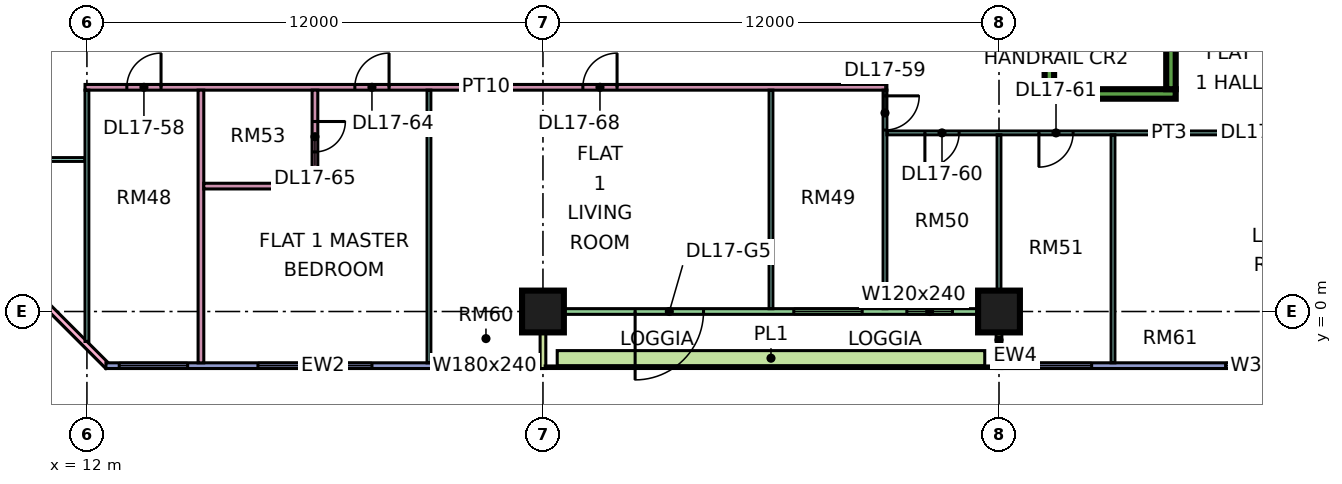
"""IFC4 building model, lengths in metres.
Left out: names, types, materials, properties, quantities, classifications, styles, units other than length and angle.
Written with IfcOpenShell. Run it as: python <this file> out.ifc"""

import sys

from ifc_helpers import new_model, si_unit, direction, frame, frame_2d, origin, origin_2d, place, context, subcontext, project, spatial, rectangle, extrude, element, fill, save


model = new_model("IFC4")
c1 = context("Model", 3, precision=1e-05, world=origin(), true_north=direction((0.0, 1.0)))
c2 = subcontext(c1, "Body", "Model", "MODEL_VIEW")
j1 = project(units=[si_unit("LENGTHUNIT", "METRE"), si_unit("PLANEANGLEUNIT", "RADIAN")], contexts=[c1])
p1 = place(None, origin())
s1 = spatial("IfcSite", under=j1, at=p1, CompositionType="ELEMENT")
p2 = place(p1, origin())
s2 = spatial("IfcBuilding", under=s1, at=p2, CompositionType="ELEMENT")
p3 = place(p2, frame((0.0, 0.0, 78.9)))
s3 = spatial("IfcBuildingStorey", under=s2, at=p3, CompositionType="ELEMENT", Elevation=78.9)
for number, where, z_axis, x_axis in (
    (1, (24.0, 0.0, 0.0), (0.0, 0.0, 1.0), (1.0, 0.0, 0.0)),
    (2, (36.0, 0.0, 0.0), (0.0, 0.0, 1.0), (1.0, 0.0, 0.0)),
):
    element("IfcColumn", number, at=place(p3, frame(where, z_axis=z_axis, x_axis=x_axis)), inside=s3, PredefinedType="COLUMN", context=c2, shape_type="SweptSolid", body=[
        extrude(rectangle(XDim=1.1, YDim=1.1, at=origin_2d()), origin(), (0.0, 0.0, 1.0), 3.75),
    ])
p4 = place(p3, frame((37.2, 5.725, 0.0), z_axis=(0.0, 0.0, 1.0), x_axis=(1.0, 0.0, 0.0)))
e3 = element("IfcWall", 3, at=p4, inside=s3, PredefinedType="SHEAR", context=c2, shape_type="SweptSolid", body=[
    extrude(rectangle(XDim=3.45, YDim=0.25, at=frame_2d((1.725, 0.0))), origin(), (0.0, 0.0, 1.0), 3.75),
])
for number, where, z_axis, x_axis in (
    (4, (37.325, 5.85, 0.0), (0.0, 0.0, 1.0), (0.0, 1.0, 0.0)),
    (5, (40.525, 5.85, 0.0), (0.0, 0.0, 1.0), (0.0, 1.0, 0.0)),
):
    element("IfcWall", number, at=place(p3, frame(where, z_axis=z_axis, x_axis=x_axis)), inside=s3, PredefinedType="SHEAR", context=c2, shape_type="SweptSolid", body=[
        extrude(rectangle(XDim=6.5, YDim=0.25, at=frame_2d((3.25, 0.0))), origin(), (0.0, 0.0, 1.0), 3.75),
    ])
p5 = place(p3, frame((-1.447, 12.553, 0.0), z_axis=(0.0, 0.0, 1.0), x_axis=(0.707106781187, -0.707106781187, 0.0)))
e6 = element("IfcWall", 6, at=p5, inside=s3, PredefinedType="SOLIDWALL", context=c2, shape_type="SweptSolid", body=[
    extrude(rectangle(XDim=19.799, YDim=0.15, at=frame_2d((9.899, 0.0))), origin(), (0.0, 0.0, 1.0), 3.35),
])
p6 = place(p5, frame((2.212, 0.0, 0.45)))
e7 = element("IfcOpeningElement", 7, at=p6, cuts=e6, PredefinedType="OPENING", context=c2, shape_type="SweptSolid", body=[
    extrude(rectangle(XDim=3.0, YDim=2.4, at=frame_2d((1.5, 1.2))), frame((0.0, 0.085, 0.0), z_axis=(0.0, -1.0, 0.0), x_axis=(1.0, 0.0, 0.0)), (0.0, 0.0, 1.0), 0.17),
])
p7 = place(p5, frame((10.216, 0.0, 0.45)))
e8 = element("IfcOpeningElement", 8, at=p7, cuts=e6, PredefinedType="OPENING", context=c2, shape_type="SweptSolid", body=[
    extrude(rectangle(XDim=3.0, YDim=2.4, at=frame_2d((1.5, 1.2))), frame((0.0, 0.085, 0.0), z_axis=(0.0, -1.0, 0.0), x_axis=(1.0, 0.0, 0.0)), (0.0, 0.0, 1.0), 0.17),
])
p8 = place(p3, frame((12.5, -1.425, 0.0), z_axis=(0.0, 0.0, 1.0), x_axis=(1.0, 0.0, 0.0)))
e9 = element("IfcWall", 9, at=p8, inside=s3, PredefinedType="SOLIDWALL", context=c2, shape_type="SweptSolid", body=[
    extrude(rectangle(XDim=11.425, YDim=0.15, at=frame_2d((5.712, 0.0))), origin(), (0.0, 0.0, 1.0), 3.35),
])
p9 = place(p8, frame((0.35, 0.0, 0.45)))
e10 = element("IfcOpeningElement", 10, at=p9, cuts=e9, PredefinedType="OPENING", context=c2, shape_type="SweptSolid", body=[
    extrude(rectangle(XDim=1.8, YDim=2.4, at=frame_2d((0.9, 1.2))), frame((0.0, 0.085, 0.0), z_axis=(0.0, -1.0, 0.0), x_axis=(1.0, 0.0, 0.0)), (0.0, 0.0, 1.0), 0.17),
])
p10 = place(p8, frame((4.0, 0.0, 0.45)))
e11 = element("IfcOpeningElement", 11, at=p10, cuts=e9, PredefinedType="OPENING", context=c2, shape_type="SweptSolid", body=[
    extrude(rectangle(XDim=3.0, YDim=2.4, at=frame_2d((1.5, 1.2))), frame((0.0, 0.085, 0.0), z_axis=(0.0, -1.0, 0.0), x_axis=(1.0, 0.0, 0.0)), (0.0, 0.0, 1.0), 0.17),
])
p11 = place(p8, frame((9.062, 0.0, 0.45)))
e12 = element("IfcOpeningElement", 12, at=p11, cuts=e9, PredefinedType="OPENING", context=c2, shape_type="SweptSolid", body=[
    extrude(rectangle(XDim=1.8, YDim=2.4, at=frame_2d((0.9, 1.2))), frame((0.0, 0.085, 0.0), z_axis=(0.0, -1.0, 0.0), x_axis=(1.0, 0.0, 0.0)), (0.0, 0.0, 1.0), 0.17),
])
p12 = place(p3, frame((24.075, 0.0, 0.0), z_axis=(0.0, 0.0, 1.0), x_axis=(1.0, 0.0, 0.0)))
e13 = element("IfcWall", 13, at=p12, inside=s3, PredefinedType="SOLIDWALL", context=c2, shape_type="SweptSolid", body=[
    extrude(rectangle(XDim=11.85, YDim=0.15, at=frame_2d((5.925, 0.0))), origin(), (0.0, 0.0, 1.0), 3.35),
])
p13 = place(p12, frame((2.35, 0.0, 0.0)))
e14 = element("IfcOpeningElement", 14, at=p13, cuts=e13, PredefinedType="OPENING", context=c2, shape_type="SweptSolid", body=[
    extrude(rectangle(XDim=1.8, YDim=2.4, at=frame_2d((0.9, 1.2))), frame((0.0, 0.085, 0.0), z_axis=(0.0, -1.0, 0.0), x_axis=(1.0, 0.0, 0.0)), (0.0, 0.0, 1.0), 0.17),
])
p14 = place(p12, frame((6.525, 0.0, 0.45)))
e15 = element("IfcOpeningElement", 15, at=p14, cuts=e13, PredefinedType="OPENING", context=c2, shape_type="SweptSolid", body=[
    extrude(rectangle(XDim=1.8, YDim=2.4, at=frame_2d((0.9, 1.2))), frame((0.0, 0.085, 0.0), z_axis=(0.0, -1.0, 0.0), x_axis=(1.0, 0.0, 0.0)), (0.0, 0.0, 1.0), 0.17),
])
p15 = place(p12, frame((9.5, 0.0, 0.45)))
e16 = element("IfcOpeningElement", 16, at=p15, cuts=e13, PredefinedType="OPENING", context=c2, shape_type="SweptSolid", body=[
    extrude(rectangle(XDim=1.2, YDim=2.4, at=frame_2d((0.6, 1.2))), frame((0.0, 0.085, 0.0), z_axis=(0.0, -1.0, 0.0), x_axis=(1.0, 0.0, 0.0)), (0.0, 0.0, 1.0), 0.17),
])
for number, where, z_axis, x_axis in (
    (17, (24.0, -1.5, 0.0), (0.0, 0.0, 1.0), (0.0, 1.0, 0.0)),
    (18, (36.0, -1.5, 0.0), (0.0, 0.0, 1.0), (0.0, 1.0, 0.0)),
):
    element("IfcWall", number, at=place(p3, frame(where, z_axis=z_axis, x_axis=x_axis)), inside=s3, PredefinedType="SOLIDWALL", context=c2, shape_type="SweptSolid", body=[
        extrude(rectangle(XDim=1.5, YDim=0.15, at=frame_2d((0.75, 0.0))), origin(), (0.0, 0.0, 1.0), 3.35),
    ])
p16 = place(p3, frame((36.075, -1.425, 0.0), z_axis=(0.0, 0.0, 1.0), x_axis=(1.0, 0.0, 0.0)))
e19 = element("IfcWall", 19, at=p16, inside=s3, PredefinedType="SOLIDWALL", context=c2, shape_type="SweptSolid", body=[
    extrude(rectangle(XDim=11.85, YDim=0.15, at=frame_2d((5.925, 0.0))), origin(), (0.0, 0.0, 1.0), 3.35),
])
p17 = place(p16, frame((0.562, 0.0, 0.45)))
e20 = element("IfcOpeningElement", 20, at=p17, cuts=e19, PredefinedType="OPENING", context=c2, shape_type="SweptSolid", body=[
    extrude(rectangle(XDim=1.8, YDim=2.4, at=frame_2d((0.9, 1.2))), frame((0.0, 0.085, 0.0), z_axis=(0.0, -1.0, 0.0), x_axis=(1.0, 0.0, 0.0)), (0.0, 0.0, 1.0), 0.17),
])
p18 = place(p16, frame((5.887, 0.0, 0.45)))
e21 = element("IfcOpeningElement", 21, at=p18, cuts=e19, PredefinedType="OPENING", context=c2, shape_type="SweptSolid", body=[
    extrude(rectangle(XDim=3.0, YDim=2.4, at=frame_2d((1.5, 1.2))), frame((0.0, 0.085, 0.0), z_axis=(0.0, -1.0, 0.0), x_axis=(1.0, 0.0, 0.0)), (0.0, 0.0, 1.0), 0.17),
])
p19 = place(p3, frame((24.375, -1.229, 0.0), z_axis=(0.0, 0.0, 1.0), x_axis=(1.0, 0.0, 0.0)))
e22 = element("IfcWall", 22, at=p19, inside=s3, PredefinedType="SOLIDWALL", context=c2, shape_type="SweptSolid", body=[
    extrude(rectangle(XDim=11.25, YDim=0.4, at=frame_2d((5.625, 0.0))), origin(), (0.0, 0.0, 1.0), 0.7),
])
p20 = place(p3, frame((9.05, 4.0, 0.0), z_axis=(0.0, 0.0, 1.0), x_axis=(1.0, 0.0, 0.0)))
e23 = element("IfcWall", 23, at=p20, inside=s3, PredefinedType="PARTITIONING", context=c2, shape_type="SweptSolid", body=[
    extrude(rectangle(XDim=2.9, YDim=0.1, at=frame_2d((1.45, 0.0))), origin(), (0.0, 0.0, 1.0), 3.35),
])
p21 = place(p3, frame((11.95, 5.9, 0.0), z_axis=(0.0, 0.0, 1.0), x_axis=(1.0, 0.0, 0.0)))
e24 = element("IfcWall", 24, at=p21, inside=s3, PredefinedType="PARTITIONING", context=c2, shape_type="SweptSolid", body=[
    extrude(rectangle(XDim=21.1, YDim=0.15, at=frame_2d((10.55, 0.0))), origin(), (0.0, 0.0, 1.0), 3.35),
])
p22 = place(p21, frame((1.1, 0.0, 0.0)))
e25 = element("IfcOpeningElement", 25, at=p22, cuts=e24, PredefinedType="OPENING", context=c2, shape_type="SweptSolid", body=[
    extrude(rectangle(XDim=0.9, YDim=2.1, at=frame_2d((0.45, 1.05))), frame((0.0, 0.085, 0.0), z_axis=(0.0, -1.0, 0.0), x_axis=(1.0, 0.0, 0.0)), (0.0, 0.0, 1.0), 0.17),
])
p23 = place(p21, frame((7.1, 0.0, 0.0)))
e26 = element("IfcOpeningElement", 26, at=p23, cuts=e24, PredefinedType="OPENING", context=c2, shape_type="SweptSolid", body=[
    extrude(rectangle(XDim=0.9, YDim=2.1, at=frame_2d((0.45, 1.05))), frame((0.0, 0.085, 0.0), z_axis=(0.0, -1.0, 0.0), x_axis=(1.0, 0.0, 0.0)), (0.0, 0.0, 1.0), 0.17),
])
p24 = place(p21, frame((13.1, 0.0, 0.0)))
e27 = element("IfcOpeningElement", 27, at=p24, cuts=e24, PredefinedType="OPENING", context=c2, shape_type="SweptSolid", body=[
    extrude(rectangle(XDim=0.9, YDim=2.1, at=frame_2d((0.45, 1.05))), frame((0.0, 0.085, 0.0), z_axis=(0.0, -1.0, 0.0), x_axis=(1.0, 0.0, 0.0)), (0.0, 0.0, 1.0), 0.17),
])
p25 = place(p3, frame((12.0, -0.788, 0.0), z_axis=(0.0, 0.0, 1.0), x_axis=(0.0, 1.0, 0.0)))
e28 = element("IfcWall", 28, at=p25, inside=s3, PredefinedType="PARTITIONING", context=c2, shape_type="SweptSolid", body=[
    extrude(rectangle(XDim=6.613, YDim=0.1, at=frame_2d((3.306, 0.0))), origin(), (0.0, 0.0, 1.0), 3.35),
])
p26 = place(p3, frame((15.0, -1.351, 0.0), z_axis=(0.0, 0.0, 1.0), x_axis=(0.0, 1.0, 0.0)))
e29 = element("IfcWall", 29, at=p26, inside=s3, PredefinedType="PARTITIONING", context=c2, shape_type="SweptSolid", body=[
    extrude(rectangle(XDim=7.176, YDim=0.15, at=frame_2d((3.588, 0.0))), origin(), (0.0, 0.0, 1.0), 3.35),
])
p27 = place(p3, frame((15.075, 3.3, 0.0), z_axis=(0.0, 0.0, 1.0), x_axis=(1.0, 0.0, 0.0)))
e30 = element("IfcWall", 30, at=p27, inside=s3, PredefinedType="PARTITIONING", context=c2, shape_type="SweptSolid", body=[
    extrude(rectangle(XDim=3.0, YDim=0.15, at=frame_2d((1.5, 0.0))), origin(), (0.0, 0.0, 1.0), 3.35),
])
p28 = place(p3, frame((18.0, 3.375, 0.0), z_axis=(0.0, 0.0, 1.0), x_axis=(0.0, 1.0, 0.0)))
e31 = element("IfcWall", 31, at=p28, inside=s3, PredefinedType="PARTITIONING", context=c2, shape_type="SweptSolid", body=[
    extrude(rectangle(XDim=2.45, YDim=0.15, at=frame_2d((1.225, 0.0))), origin(), (0.0, 0.0, 1.0), 3.35),
])
p29 = place(p28, frame((0.825, 0.0, 0.0)))
e32 = element("IfcOpeningElement", 32, at=p29, cuts=e31, PredefinedType="OPENING", context=c2, shape_type="SweptSolid", body=[
    extrude(rectangle(XDim=0.8, YDim=2.1, at=frame_2d((0.4, 1.05))), frame((0.0, 0.085, 0.0), z_axis=(0.0, -1.0, 0.0), x_axis=(1.0, 0.0, 0.0)), (0.0, 0.0, 1.0), 0.17),
])
p30 = place(p3, frame((21.0, -1.35, 0.0), z_axis=(0.0, 0.0, 1.0), x_axis=(0.0, 1.0, 0.0)))
e33 = element("IfcWall", 33, at=p30, inside=s3, PredefinedType="PARTITIONING", context=c2, shape_type="SweptSolid", body=[
    extrude(rectangle(XDim=7.175, YDim=0.1, at=frame_2d((3.587, 0.0))), origin(), (0.0, 0.0, 1.0), 3.35),
])
p31 = place(p3, frame((30.0, 0.074, 0.0), z_axis=(0.0, 0.0, 1.0), x_axis=(0.0, 1.0, 0.0)))
e34 = element("IfcWall", 34, at=p31, inside=s3, PredefinedType="PARTITIONING", context=c2, shape_type="SweptSolid", body=[
    extrude(rectangle(XDim=5.751, YDim=0.1, at=frame_2d((2.875, 0.0))), origin(), (0.0, 0.0, 1.0), 3.35),
])
p32 = place(p3, frame((33.0, 0.074, 0.0), z_axis=(0.0, 0.0, 1.0), x_axis=(0.0, 1.0, 0.0)))
e35 = element("IfcWall", 35, at=p32, inside=s3, PredefinedType="PARTITIONING", context=c2, shape_type="SweptSolid", body=[
    extrude(rectangle(XDim=5.751, YDim=0.1, at=frame_2d((2.875, 0.0))), origin(), (0.0, 0.0, 1.0), 3.35),
])
p33 = place(p32, frame((4.701, 0.0, 0.0)))
e36 = element("IfcOpeningElement", 36, at=p33, cuts=e35, PredefinedType="OPENING", context=c2, shape_type="SweptSolid", body=[
    extrude(rectangle(XDim=0.9, YDim=2.1, at=frame_2d((0.45, 1.05))), frame((0.0, 0.06, 0.0), z_axis=(0.0, -1.0, 0.0), x_axis=(1.0, 0.0, 0.0)), (0.0, 0.0, 1.0), 0.12),
])
p34 = place(p3, frame((33.05, 4.7, 0.0), z_axis=(0.0, 0.0, 1.0), x_axis=(1.0, 0.0, 0.0)))
e37 = element("IfcWall", 37, at=p34, inside=s3, PredefinedType="PARTITIONING", context=c2, shape_type="SweptSolid", body=[
    extrude(rectangle(XDim=14.85, YDim=0.1, at=frame_2d((7.425, 0.0))), origin(), (0.0, 0.0, 1.0), 3.35),
])
p35 = place(p34, frame((1.0, 0.0, 0.0)))
e38 = element("IfcOpeningElement", 38, at=p35, cuts=e37, PredefinedType="OPENING", context=c2, shape_type="SweptSolid", body=[
    extrude(rectangle(XDim=0.9, YDim=2.1, at=frame_2d((0.45, 1.05))), frame((0.0, 0.06, 0.0), z_axis=(0.0, -1.0, 0.0), x_axis=(1.0, 0.0, 0.0)), (0.0, 0.0, 1.0), 0.12),
])
p36 = place(p34, frame((4.0, 0.0, 0.0)))
e39 = element("IfcOpeningElement", 39, at=p36, cuts=e37, PredefinedType="OPENING", context=c2, shape_type="SweptSolid", body=[
    extrude(rectangle(XDim=0.9, YDim=2.1, at=frame_2d((0.45, 1.05))), frame((0.0, 0.06, 0.0), z_axis=(0.0, -1.0, 0.0), x_axis=(1.0, 0.0, 0.0)), (0.0, 0.0, 1.0), 0.12),
])
p37 = place(p34, frame((10.0, 0.0, 0.0)))
e40 = element("IfcOpeningElement", 40, at=p37, cuts=e37, PredefinedType="OPENING", context=c2, shape_type="SweptSolid", body=[
    extrude(rectangle(XDim=0.9, YDim=2.1, at=frame_2d((0.45, 1.05))), frame((0.0, 0.06, 0.0), z_axis=(0.0, -1.0, 0.0), x_axis=(1.0, 0.0, 0.0)), (0.0, 0.0, 1.0), 0.12),
])
p38 = place(p3, frame((36.0, 0.0, 0.0), z_axis=(0.0, 0.0, 1.0), x_axis=(0.0, 1.0, 0.0)))
e41 = element("IfcWall", 41, at=p38, inside=s3, PredefinedType="PARTITIONING", context=c2, shape_type="SweptSolid", body=[
    extrude(rectangle(XDim=4.65, YDim=0.1, at=frame_2d((2.325, 0.0))), origin(), (0.0, 0.0, 1.0), 3.35),
])
p39 = place(p3, frame((39.0, -1.35, 0.0), z_axis=(0.0, 0.0, 1.0), x_axis=(0.0, 1.0, 0.0)))
e42 = element("IfcWall", 42, at=p39, inside=s3, PredefinedType="PARTITIONING", context=c2, shape_type="SweptSolid", body=[
    extrude(rectangle(XDim=6.0, YDim=0.1, at=frame_2d((3.0, 0.0))), origin(), (0.0, 0.0, 1.0), 3.35),
])
p40 = place(p9, origin())
e43 = element("IfcWindow", 43, at=p40, inside=s3, PartitioningType="SINGLE_PANEL", PredefinedType="WINDOW", context=c2, shape_type="SweptSolid", body=[
    extrude(rectangle(XDim=1.8, YDim=2.4, at=frame_2d((0.9, 1.2))), frame((0.0, 0.03, 0.0), z_axis=(0.0, -1.0, 0.0), x_axis=(1.0, 0.0, 0.0)), (0.0, 0.0, 1.0), 0.06),
])
fill(e10, e43)
p41 = place(p10, origin())
e44 = element("IfcWindow", 44, at=p41, inside=s3, PartitioningType="SINGLE_PANEL", PredefinedType="WINDOW", context=c2, shape_type="SweptSolid", body=[
    extrude(rectangle(XDim=3.0, YDim=2.4, at=frame_2d((1.5, 1.2))), frame((0.0, 0.03, 0.0), z_axis=(0.0, -1.0, 0.0), x_axis=(1.0, 0.0, 0.0)), (0.0, 0.0, 1.0), 0.06),
])
fill(e11, e44)
p42 = place(p11, origin())
e45 = element("IfcWindow", 45, at=p42, inside=s3, PartitioningType="SINGLE_PANEL", PredefinedType="WINDOW", context=c2, shape_type="SweptSolid", body=[
    extrude(rectangle(XDim=1.8, YDim=2.4, at=frame_2d((0.9, 1.2))), frame((0.0, 0.03, 0.0), z_axis=(0.0, -1.0, 0.0), x_axis=(1.0, 0.0, 0.0)), (0.0, 0.0, 1.0), 0.06),
])
fill(e12, e45)
p43 = place(p13, frame((1.8, 0.0, 0.0), z_axis=(0.0, 0.0, 1.0), x_axis=(-1.0, 0.0, 0.0)))
e46 = element("IfcDoor", 46, at=p43, inside=s3, OperationType="DOUBLE_DOOR_SINGLE_SWING", PredefinedType="DOOR", context=c2, shape_type="SweptSolid", body=[
    extrude(rectangle(XDim=1.8, YDim=2.4, at=frame_2d((0.9, 1.2))), frame((0.0, 0.025, 0.0), z_axis=(0.0, -1.0, 0.0), x_axis=(1.0, 0.0, 0.0)), (0.0, 0.0, 1.0), 0.05),
])
fill(e14, e46)
p44 = place(p14, origin())
e47 = element("IfcWindow", 47, at=p44, inside=s3, PartitioningType="SINGLE_PANEL", PredefinedType="WINDOW", context=c2, shape_type="SweptSolid", body=[
    extrude(rectangle(XDim=1.8, YDim=2.4, at=frame_2d((0.9, 1.2))), frame((0.0, 0.03, 0.0), z_axis=(0.0, -1.0, 0.0), x_axis=(1.0, 0.0, 0.0)), (0.0, 0.0, 1.0), 0.06),
])
fill(e15, e47)
p45 = place(p15, origin())
e48 = element("IfcWindow", 48, at=p45, inside=s3, PartitioningType="SINGLE_PANEL", PredefinedType="WINDOW", context=c2, shape_type="SweptSolid", body=[
    extrude(rectangle(XDim=1.2, YDim=2.4, at=frame_2d((0.6, 1.2))), frame((0.0, 0.03, 0.0), z_axis=(0.0, -1.0, 0.0), x_axis=(1.0, 0.0, 0.0)), (0.0, 0.0, 1.0), 0.06),
])
fill(e16, e48)
p46 = place(p17, origin())
e49 = element("IfcWindow", 49, at=p46, inside=s3, PartitioningType="SINGLE_PANEL", PredefinedType="WINDOW", context=c2, shape_type="SweptSolid", body=[
    extrude(rectangle(XDim=1.8, YDim=2.4, at=frame_2d((0.9, 1.2))), frame((0.0, 0.03, 0.0), z_axis=(0.0, -1.0, 0.0), x_axis=(1.0, 0.0, 0.0)), (0.0, 0.0, 1.0), 0.06),
])
fill(e20, e49)
p47 = place(p18, origin())
e50 = element("IfcWindow", 50, at=p47, inside=s3, PartitioningType="SINGLE_PANEL", PredefinedType="WINDOW", context=c2, shape_type="SweptSolid", body=[
    extrude(rectangle(XDim=3.0, YDim=2.4, at=frame_2d((1.5, 1.2))), frame((0.0, 0.03, 0.0), z_axis=(0.0, -1.0, 0.0), x_axis=(1.0, 0.0, 0.0)), (0.0, 0.0, 1.0), 0.06),
])
fill(e21, e50)
p48 = place(p22, frame((0.9, 0.0, 0.0), z_axis=(0.0, 0.0, 1.0), x_axis=(-1.0, 0.0, 0.0)))
e51 = element("IfcDoor", 51, at=p48, inside=s3, OperationType="SINGLE_SWING_RIGHT", PredefinedType="DOOR", context=c2, shape_type="SweptSolid", body=[
    extrude(rectangle(XDim=0.9, YDim=2.1, at=frame_2d((0.45, 1.05))), frame((0.0, 0.025, 0.0), z_axis=(0.0, -1.0, 0.0), x_axis=(1.0, 0.0, 0.0)), (0.0, 0.0, 1.0), 0.05),
])
fill(e25, e51)
p49 = place(p33, origin())
e52 = element("IfcDoor", 52, at=p49, inside=s3, OperationType="SINGLE_SWING_RIGHT", PredefinedType="DOOR", context=c2, shape_type="SweptSolid", body=[
    extrude(rectangle(XDim=0.9, YDim=2.1, at=frame_2d((0.45, 1.05))), frame((0.0, 0.025, 0.0), z_axis=(0.0, -1.0, 0.0), x_axis=(1.0, 0.0, 0.0)), (0.0, 0.0, 1.0), 0.05),
])
fill(e36, e52)
p50 = place(p35, frame((0.9, 0.0, 0.0), z_axis=(0.0, 0.0, 1.0), x_axis=(-1.0, 0.0, 0.0)))
e53 = element("IfcDoor", 53, at=p50, inside=s3, OperationType="SINGLE_SWING_LEFT", PredefinedType="DOOR", context=c2, shape_type="SweptSolid", body=[
    extrude(rectangle(XDim=0.9, YDim=2.1, at=frame_2d((0.45, 1.05))), frame((0.0, 0.025, 0.0), z_axis=(0.0, -1.0, 0.0), x_axis=(1.0, 0.0, 0.0)), (0.0, 0.0, 1.0), 0.05),
])
fill(e38, e53)
p51 = place(p36, frame((0.9, 0.0, 0.0), z_axis=(0.0, 0.0, 1.0), x_axis=(-1.0, 0.0, 0.0)))
e54 = element("IfcDoor", 54, at=p51, inside=s3, OperationType="SINGLE_SWING_LEFT", PredefinedType="DOOR", context=c2, shape_type="SweptSolid", body=[
    extrude(rectangle(XDim=0.9, YDim=2.1, at=frame_2d((0.45, 1.05))), frame((0.0, 0.025, 0.0), z_axis=(0.0, -1.0, 0.0), x_axis=(1.0, 0.0, 0.0)), (0.0, 0.0, 1.0), 0.05),
])
fill(e39, e54)
p52 = place(p23, frame((0.9, 0.0, 0.0), z_axis=(0.0, 0.0, 1.0), x_axis=(-1.0, 0.0, 0.0)))
e55 = element("IfcDoor", 55, at=p52, inside=s3, OperationType="SINGLE_SWING_RIGHT", PredefinedType="DOOR", context=c2, shape_type="SweptSolid", body=[
    extrude(rectangle(XDim=0.9, YDim=2.1, at=frame_2d((0.45, 1.05))), frame((0.0, 0.025, 0.0), z_axis=(0.0, -1.0, 0.0), x_axis=(1.0, 0.0, 0.0)), (0.0, 0.0, 1.0), 0.05),
])
fill(e26, e55)
p53 = place(p29, origin())
e56 = element("IfcDoor", 56, at=p53, inside=s3, OperationType="SINGLE_SWING_RIGHT", PredefinedType="DOOR", context=c2, shape_type="SweptSolid", body=[
    extrude(rectangle(XDim=0.8, YDim=2.1, at=frame_2d((0.4, 1.05))), frame((0.0, 0.025, 0.0), z_axis=(0.0, -1.0, 0.0), x_axis=(1.0, 0.0, 0.0)), (0.0, 0.0, 1.0), 0.05),
])
fill(e32, e56)
p54 = place(p24, frame((0.9, 0.0, 0.0), z_axis=(0.0, 0.0, 1.0), x_axis=(-1.0, 0.0, 0.0)))
e57 = element("IfcDoor", 57, at=p54, inside=s3, OperationType="SINGLE_SWING_RIGHT", PredefinedType="DOOR", context=c2, shape_type="SweptSolid", body=[
    extrude(rectangle(XDim=0.9, YDim=2.1, at=frame_2d((0.45, 1.05))), frame((0.0, 0.025, 0.0), z_axis=(0.0, -1.0, 0.0), x_axis=(1.0, 0.0, 0.0)), (0.0, 0.0, 1.0), 0.05),
])
fill(e27, e57)
save(model, sys.argv[1])
